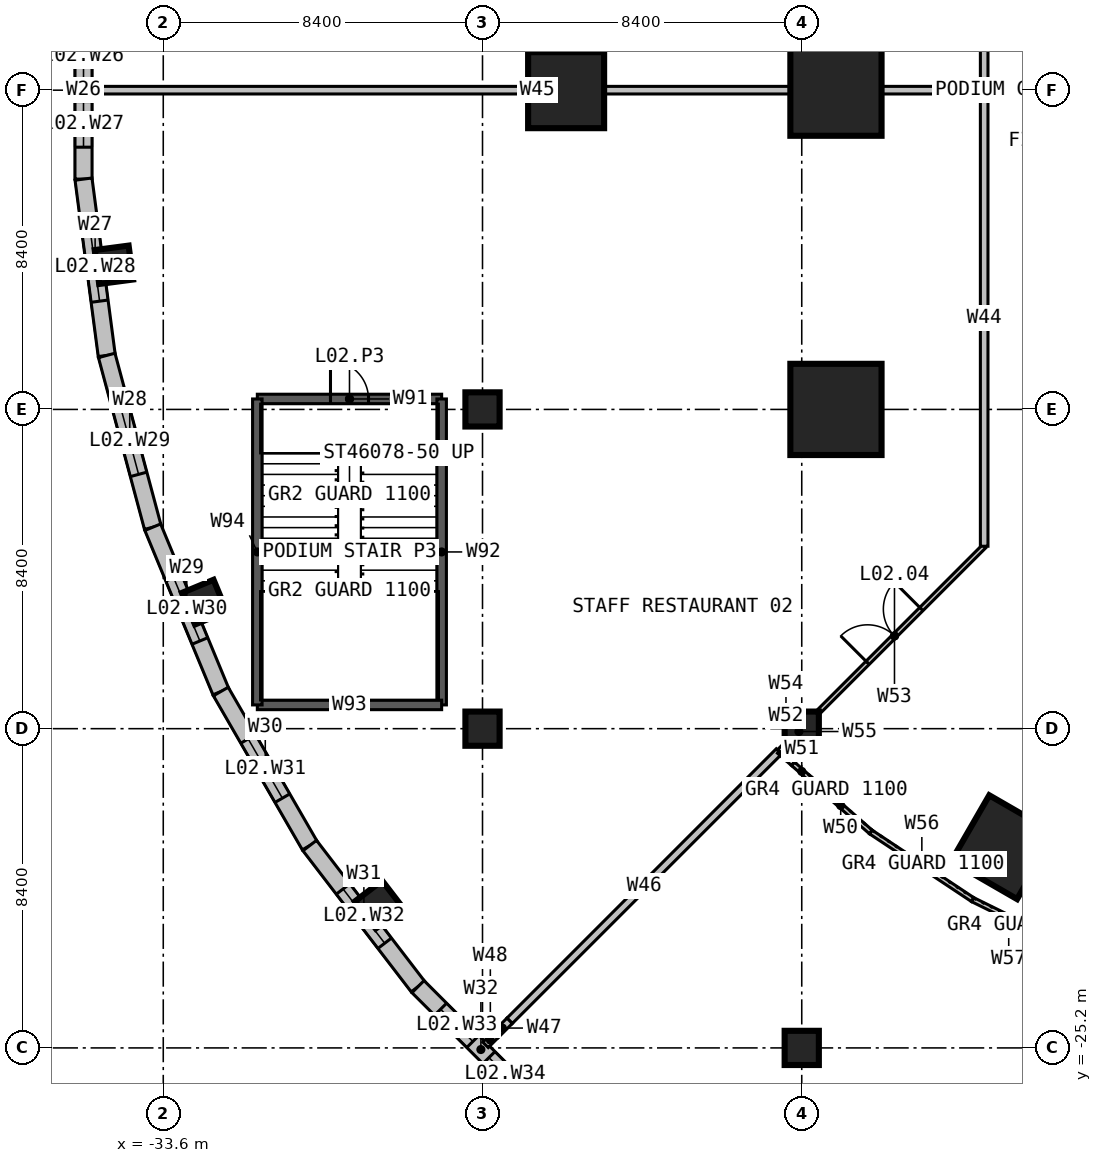
"""IFC4 building model, lengths in metres.
Left out: names, types, materials, properties, quantities, classifications, styles, units other than length and angle.
Written with IfcOpenShell. Run it as: python <this file> out.ifc"""

import sys

from ifc_helpers import new_model, si_unit, direction, frame, frame_2d, origin, origin_2d, place, context, subcontext, project, spatial, rectangle, hollow_rectangle, extrude, element, fill, save


model = new_model("IFC4")
c1 = context("Model", 3, precision=1e-05, world=origin(), true_north=direction((0.0, 1.0)))
c2 = subcontext(c1, "Body", "Model", "MODEL_VIEW")
j1 = project(units=[si_unit("LENGTHUNIT", "METRE"), si_unit("PLANEANGLEUNIT", "RADIAN")], contexts=[c1])
p1 = place(None, origin())
s1 = spatial("IfcSite", under=j1, at=p1, CompositionType="ELEMENT")
p2 = place(p1, origin())
s2 = spatial("IfcBuilding", under=s1, at=p2, CompositionType="ELEMENT")
p3 = place(p2, frame((0.0, 0.0, 11.0)))
s3 = spatial("IfcBuildingStorey", under=s2, at=p3, CompositionType="ELEMENT", Elevation=11.0)
for number, where, z_axis, x_axis in (
    (1, (-25.2, -16.8, 0.0), (0.0, 0.0, 1.0), (1.0, 0.0, 0.0)),
    (2, (-25.2, -8.4, 0.0), (0.0, 0.0, 1.0), (1.0, 0.0, 0.0)),
    (3, (-16.8, -25.2, 0.0), (0.0, 0.0, 1.0), (1.0, 0.0, 0.0)),
    (4, (-16.8, -16.8, 0.0), (0.0, 0.0, 1.0), (1.0, 0.0, 0.0)),
):
    element("IfcColumn", number, at=place(p3, frame(where, z_axis=z_axis, x_axis=x_axis)), inside=s3, PredefinedType="COLUMN", context=c2, shape_type="SweptSolid", body=[
        extrude(rectangle(XDim=0.9, YDim=0.9, at=origin_2d()), origin(), (0.0, 0.0, 1.0), 5.0),
    ])
for number, where, z_axis, x_axis in (
    (5, (-15.9, -8.4, 0.0), (0.0, 0.0, 1.0), (1.0, 0.0, 0.0)),
    (6, (-15.9, 0.0, 0.0), (0.0, 0.0, 1.0), (1.0, 0.0, 0.0)),
):
    element("IfcColumn", number, at=place(p3, frame(where, z_axis=z_axis, x_axis=x_axis)), inside=s3, PredefinedType="COLUMN", context=c2, shape_type="SweptSolid", body=[
        extrude(rectangle(XDim=2.4, YDim=2.4, at=origin_2d()), origin(), (0.0, 0.0, 1.0), 5.0),
    ])
for number, where, z_axis, x_axis in (
    (7, (-34.899, -4.594, 0.0), (0.0, 0.0, 1.0), (-0.991, -0.131, 0.0)),
    (8, (-32.521, -13.47, 0.0), (0.0, 0.0, 1.0), (-0.924, -0.383, 0.0)),
    (9, (-27.926, -21.428, 0.0), (0.0, 0.0, 1.0), (-0.793, -0.609, 0.0)),
):
    element("IfcColumn", number, at=place(p3, frame(where, z_axis=z_axis, x_axis=x_axis)), inside=s3, PredefinedType="COLUMN", context=c2, shape_type="SweptSolid", body=[
        extrude(rectangle(XDim=0.9, YDim=0.9, at=origin_2d()), origin(), (0.0, 0.0, 1.0), 5.0),
    ])
for number, where, z_axis, x_axis in (
    (10, (-23.0, 0.0, 0.0), (0.0, 0.0, 1.0), (-1.0, 0.0, 0.0)),
    (11, (-11.5, -19.919, 0.0), (0.0, 0.0, 1.0), (-0.5, -0.866, 0.0)),
):
    element("IfcColumn", number, at=place(p3, frame(where, z_axis=z_axis, x_axis=x_axis)), inside=s3, PredefinedType="COLUMN", context=c2, shape_type="SweptSolid", body=[
        extrude(hollow_rectangle(XDim=2.0, YDim=2.0, WallThickness=0.24, at=origin_2d()), origin(), (0.0, 0.0, 1.0), 5.0),
    ])
p4 = place(p3, frame((-35.698, 2.34, 0.0), z_axis=(0.0, 0.0, 1.0), x_axis=(0.0, -1.0, 0.0)))
e12 = element("IfcWall", 12, at=p4, inside=s3, PredefinedType="SOLIDWALL", context=c2, shape_type="SweptSolid", body=[
    extrude(rectangle(XDim=4.68, YDim=0.45, at=frame_2d((2.34, 0.0))), origin(), (0.0, 0.0, 1.0), 4.7),
])
p5 = place(p4, frame((0.84, 0.0, 0.9)))
e13 = element("IfcOpeningElement", 13, at=p5, cuts=e12, PredefinedType="OPENING", context=c2, shape_type="SweptSolid", body=[
    extrude(rectangle(XDim=1.2, YDim=2.4, at=frame_2d((0.6, 1.2))), frame((0.0, 0.235, 0.0), z_axis=(0.0, -1.0, 0.0), x_axis=(1.0, 0.0, 0.0)), (0.0, 0.0, 1.0), 0.47),
])
p6 = place(p4, frame((2.64, 0.0, 0.9)))
e14 = element("IfcOpeningElement", 14, at=p6, cuts=e12, PredefinedType="OPENING", context=c2, shape_type="SweptSolid", body=[
    extrude(rectangle(XDim=1.2, YDim=2.4, at=frame_2d((0.6, 1.2))), frame((0.0, 0.235, 0.0), z_axis=(0.0, -1.0, 0.0), x_axis=(1.0, 0.0, 0.0)), (0.0, 0.0, 1.0), 0.47),
])
p7 = place(p3, frame((-35.698, -2.34, 0.0), z_axis=(0.0, 0.0, 1.0), x_axis=(0.130536838198, -0.991443459746, 0.0)))
e15 = element("IfcWall", 15, at=p7, inside=s3, PredefinedType="SOLIDWALL", context=c2, shape_type="SweptSolid", body=[
    extrude(rectangle(XDim=4.679, YDim=0.45, at=frame_2d((2.34, 0.0))), origin(), (0.0, 0.0, 1.0), 4.7),
])
p8 = place(p7, frame((1.44, 0.0, 0.9)))
e16 = element("IfcOpeningElement", 16, at=p8, cuts=e15, PredefinedType="OPENING", context=c2, shape_type="SweptSolid", body=[
    extrude(rectangle(XDim=1.8, YDim=2.4, at=frame_2d((0.9, 1.2))), frame((0.0, 0.235, 0.0), z_axis=(0.0, -1.0, 0.0), x_axis=(1.0, 0.0, 0.0)), (0.0, 0.0, 1.0), 0.47),
])
p9 = place(p3, frame((-35.088, -6.979, 0.0), z_axis=(0.0, 0.0, 1.0), x_axis=(0.258815185258, -0.965926860523, 0.0)))
e17 = element("IfcWall", 17, at=p9, inside=s3, PredefinedType="SOLIDWALL", context=c2, shape_type="SweptSolid", body=[
    extrude(rectangle(XDim=4.68, YDim=0.45, at=frame_2d((2.34, 0.0))), origin(), (0.0, 0.0, 1.0), 4.7),
])
p10 = place(p9, frame((1.44, 0.0, 0.9)))
e18 = element("IfcOpeningElement", 18, at=p10, cuts=e17, PredefinedType="OPENING", context=c2, shape_type="SweptSolid", body=[
    extrude(rectangle(XDim=1.8, YDim=2.4, at=frame_2d((0.9, 1.2))), frame((0.0, 0.235, 0.0), z_axis=(0.0, -1.0, 0.0), x_axis=(1.0, 0.0, 0.0)), (0.0, 0.0, 1.0), 0.47),
])
p11 = place(p3, frame((-33.876, -11.5, 0.0), z_axis=(0.0, 0.0, 1.0), x_axis=(0.382669718086, -0.923885213032, 0.0)))
e19 = element("IfcWall", 19, at=p11, inside=s3, PredefinedType="SOLIDWALL", context=c2, shape_type="SweptSolid", body=[
    extrude(rectangle(XDim=4.68, YDim=0.45, at=frame_2d((2.34, 0.0))), origin(), (0.0, 0.0, 1.0), 4.7),
])
p12 = place(p11, frame((1.44, 0.0, 0.9)))
e20 = element("IfcOpeningElement", 20, at=p12, cuts=e19, PredefinedType="OPENING", context=c2, shape_type="SweptSolid", body=[
    extrude(rectangle(XDim=1.8, YDim=2.4, at=frame_2d((0.9, 1.2))), frame((0.0, 0.235, 0.0), z_axis=(0.0, -1.0, 0.0), x_axis=(1.0, 0.0, 0.0)), (0.0, 0.0, 1.0), 0.47),
])
p13 = place(p3, frame((-32.086, -15.823, 0.0), z_axis=(0.0, 0.0, 1.0), x_axis=(0.500022025083, -0.866012687223, 0.0)))
e21 = element("IfcWall", 21, at=p13, inside=s3, PredefinedType="SOLIDWALL", context=c2, shape_type="SweptSolid", body=[
    extrude(rectangle(XDim=4.679, YDim=0.45, at=frame_2d((2.34, 0.0))), origin(), (0.0, 0.0, 1.0), 4.7),
])
p14 = place(p13, frame((1.44, 0.0, 0.9)))
e22 = element("IfcOpeningElement", 22, at=p14, cuts=e21, PredefinedType="OPENING", context=c2, shape_type="SweptSolid", body=[
    extrude(rectangle(XDim=1.8, YDim=2.4, at=frame_2d((0.9, 1.2))), frame((0.0, 0.235, 0.0), z_axis=(0.0, -1.0, 0.0), x_axis=(1.0, 0.0, 0.0)), (0.0, 0.0, 1.0), 0.47),
])
p15 = place(p3, frame((-29.746, -19.875, 0.0), z_axis=(0.0, 0.0, 1.0), x_axis=(0.608769916927, -0.79334682721, 0.0)))
e23 = element("IfcWall", 23, at=p15, inside=s3, PredefinedType="SOLIDWALL", context=c2, shape_type="SweptSolid", body=[
    extrude(rectangle(XDim=4.68, YDim=0.45, at=frame_2d((2.34, 0.0))), origin(), (0.0, 0.0, 1.0), 4.7),
])
p16 = place(p15, frame((1.44, 0.0, 0.9)))
e24 = element("IfcOpeningElement", 24, at=p16, cuts=e23, PredefinedType="OPENING", context=c2, shape_type="SweptSolid", body=[
    extrude(rectangle(XDim=1.8, YDim=2.4, at=frame_2d((0.9, 1.2))), frame((0.0, 0.235, 0.0), z_axis=(0.0, -1.0, 0.0), x_axis=(1.0, 0.0, 0.0)), (0.0, 0.0, 1.0), 0.47),
])
p17 = place(p3, frame((-26.897, -23.588, 0.0), z_axis=(0.0, 0.0, 1.0), x_axis=(0.707106781187, -0.707106781187, 0.0)))
e25 = element("IfcWall", 25, at=p17, inside=s3, PredefinedType="SOLIDWALL", context=c2, shape_type="SweptSolid", body=[
    extrude(rectangle(XDim=4.679, YDim=0.45, at=frame_2d((2.34, 0.0))), origin(), (0.0, 0.0, 1.0), 4.7),
])
p18 = place(p17, frame((0.84, 0.0, 0.9)))
e26 = element("IfcOpeningElement", 26, at=p18, cuts=e25, PredefinedType="OPENING", context=c2, shape_type="SweptSolid", body=[
    extrude(rectangle(XDim=1.2, YDim=2.4, at=frame_2d((0.6, 1.2))), frame((0.0, 0.235, 0.0), z_axis=(0.0, -1.0, 0.0), x_axis=(1.0, 0.0, 0.0)), (0.0, 0.0, 1.0), 0.47),
])
p19 = place(p17, frame((2.64, 0.0, 0.9)))
e27 = element("IfcOpeningElement", 27, at=p19, cuts=e25, PredefinedType="OPENING", context=c2, shape_type="SweptSolid", body=[
    extrude(rectangle(XDim=1.2, YDim=2.4, at=frame_2d((0.6, 1.2))), frame((0.0, 0.235, 0.0), z_axis=(0.0, -1.0, 0.0), x_axis=(1.0, 0.0, 0.0)), (0.0, 0.0, 1.0), 0.47),
])
p20 = place(p3, frame((-31.125, -8.125, 0.0), z_axis=(0.0, 0.0, 1.0), x_axis=(1.0, 0.0, 0.0)))
e28 = element("IfcWall", 28, at=p20, inside=s3, PredefinedType="SOLIDWALL", context=c2, shape_type="SweptSolid", body=[
    extrude(rectangle(XDim=4.85, YDim=0.25, at=frame_2d((2.425, 0.0))), origin(), (0.0, 0.0, 1.0), 5.0),
])
p21 = place(p20, frame((1.925, 0.0, 0.0)))
e29 = element("IfcOpeningElement", 29, at=p21, cuts=e28, PredefinedType="OPENING", context=c2, shape_type="SweptSolid", body=[
    extrude(rectangle(XDim=1.0, YDim=2.2, at=frame_2d((0.5, 1.1))), frame((0.0, 0.135, 0.0), z_axis=(0.0, -1.0, 0.0), x_axis=(1.0, 0.0, 0.0)), (0.0, 0.0, 1.0), 0.27),
])
p22 = place(p3, frame((-26.275, -8.125, 0.0), z_axis=(0.0, 0.0, 1.0), x_axis=(0.0, -1.0, 0.0)))
e30 = element("IfcWall", 30, at=p22, inside=s3, PredefinedType="SOLIDWALL", context=c2, shape_type="SweptSolid", body=[
    extrude(rectangle(XDim=8.05, YDim=0.25, at=frame_2d((4.025, 0.0))), origin(), (0.0, 0.0, 1.0), 5.0),
])
p23 = place(p3, frame((-26.275, -16.175, 0.0), z_axis=(0.0, 0.0, 1.0), x_axis=(-1.0, 0.0, 0.0)))
e31 = element("IfcWall", 31, at=p23, inside=s3, PredefinedType="SOLIDWALL", context=c2, shape_type="SweptSolid", body=[
    extrude(rectangle(XDim=4.85, YDim=0.25, at=frame_2d((2.425, 0.0))), origin(), (0.0, 0.0, 1.0), 5.0),
])
p24 = place(p3, frame((-31.125, -16.175, 0.0), z_axis=(0.0, 0.0, 1.0), x_axis=(0.0, 1.0, 0.0)))
e32 = element("IfcWall", 32, at=p24, inside=s3, PredefinedType="SOLIDWALL", context=c2, shape_type="SweptSolid", body=[
    extrude(rectangle(XDim=8.05, YDim=0.25, at=frame_2d((4.025, 0.0))), origin(), (0.0, 0.0, 1.0), 5.0),
])
p25 = place(p3, frame((-35.52, 0.0, 0.0), z_axis=(0.0, 0.0, 1.0), x_axis=(1.0, 0.0, 0.0)))
e33 = element("IfcWall", 33, at=p25, inside=s3, PredefinedType="PARTITIONING", context=c2, shape_type="SweptSolid", body=[
    extrude(rectangle(XDim=23.52, YDim=0.2, at=frame_2d((11.76, 0.0))), origin(), (0.0, 0.0, 1.0), 4.7),
])
p26 = place(p3, frame((-24.486, -24.486, 0.0), z_axis=(0.0, 0.0, 1.0), x_axis=(0.707106781187, 0.707106781187, 0.0)))
e34 = element("IfcWall", 34, at=p26, inside=s3, PredefinedType="PARTITIONING", context=c2, shape_type="SweptSolid", body=[
    extrude(rectangle(XDim=10.022, YDim=0.2, at=frame_2d((5.011, 0.0))), origin(), (0.0, 0.0, 1.0), 4.7),
])
p27 = place(p3, frame((-24.868, -24.868, 0.0), z_axis=(0.0, 0.0, 1.0), x_axis=(0.707106781187, 0.707106781187, 0.0)))
e35 = element("IfcWall", 35, at=p27, inside=s3, PredefinedType="PARTITIONING", context=c2, shape_type="SweptSolid", body=[
    extrude(rectangle(XDim=0.54, YDim=0.2, at=frame_2d((0.27, 0.0))), origin(), (0.0, 0.0, 1.0), 4.3),
])
p28 = place(p3, frame((-25.12, -25.12, 0.0), z_axis=(0.0, 0.0, 1.0), x_axis=(0.707106781187, 0.707106781187, 0.0)))
e36 = element("IfcWall", 36, at=p28, inside=s3, PredefinedType="PARTITIONING", context=c2, shape_type="SweptSolid", body=[
    extrude(rectangle(XDim=0.356, YDim=0.2, at=frame_2d((0.178, 0.0))), origin(), (0.0, 0.0, 1.0), 4.7),
])
p29 = place(p3, frame((-16.57, -18.127, 0.0), z_axis=(0.0, 0.0, 1.0), x_axis=(0.752226011438, -0.658905173538, 0.0)))
e37 = element("IfcWall", 37, at=p29, inside=s3, PredefinedType="PARTITIONING", context=c2, shape_type="SweptSolid", body=[
    extrude(rectangle(XDim=2.114, YDim=0.12, at=frame_2d((1.057, 0.0))), origin(), (0.0, 0.0, 1.0), 4.7),
])
p30 = place(p3, frame((-17.03, -17.724, 0.0), z_axis=(0.0, 0.0, 1.0), x_axis=(0.752081905539, -0.65906965289, 0.0)))
e38 = element("IfcWall", 38, at=p30, inside=s3, PredefinedType="PARTITIONING", context=c2, shape_type="SweptSolid", body=[
    extrude(rectangle(XDim=0.612, YDim=0.12, at=frame_2d((0.306, 0.0))), origin(), (0.0, 0.0, 1.0), 4.3),
])
p31 = place(p3, frame((-17.4, -17.4, 0.0), z_axis=(0.0, 0.0, 1.0), x_axis=(0.751992181934, -0.659172024824, 0.0)))
e39 = element("IfcWall", 39, at=p31, inside=s3, PredefinedType="PARTITIONING", context=c2, shape_type="SweptSolid", body=[
    extrude(rectangle(XDim=0.492, YDim=0.12, at=frame_2d((0.246, 0.0))), origin(), (0.0, 0.0, 1.0), 4.7),
])
p32 = place(p3, frame((-16.72, -16.72, 0.0), z_axis=(0.0, 0.0, 1.0), x_axis=(0.707106781187, 0.707106781187, 0.0)))
e40 = element("IfcWall", 40, at=p32, inside=s3, PredefinedType="PARTITIONING", context=c2, shape_type="SweptSolid", body=[
    extrude(rectangle(XDim=6.675, YDim=0.12, at=frame_2d((3.337, 0.0))), origin(), (0.0, 0.0, 1.0), 4.7),
])
p33 = place(p32, frame((2.338, 0.0, 0.0)))
e41 = element("IfcOpeningElement", 41, at=p33, cuts=e40, PredefinedType="OPENING", context=c2, shape_type="SweptSolid", body=[
    extrude(rectangle(XDim=2.0, YDim=2.4, at=frame_2d((1.0, 1.2))), frame((0.0, 0.07, 0.0), z_axis=(0.0, -1.0, 0.0), x_axis=(1.0, 0.0, 0.0)), (0.0, 0.0, 1.0), 0.14),
])
p34 = place(p3, frame((-17.4, -17.4, 0.0), z_axis=(0.0, 0.0, 1.0), x_axis=(0.707106781187, 0.707106781187, 0.0)))
e42 = element("IfcWall", 42, at=p34, inside=s3, PredefinedType="PARTITIONING", context=c2, shape_type="SweptSolid", body=[
    extrude(rectangle(XDim=0.523, YDim=0.12, at=frame_2d((0.262, 0.0))), origin(), (0.0, 0.0, 1.0), 4.7),
])
p35 = place(p3, frame((-17.03, -17.03, 0.0), z_axis=(0.0, 0.0, 1.0), x_axis=(0.707106781187, 0.707106781187, 0.0)))
e43 = element("IfcWall", 43, at=p35, inside=s3, PredefinedType="PARTITIONING", context=c2, shape_type="SweptSolid", body=[
    extrude(rectangle(XDim=0.438, YDim=0.12, at=frame_2d((0.219, 0.0))), origin(), (0.0, 0.0, 1.0), 4.3),
])
p36 = place(p3, frame((-14.98, -19.52, 0.0), z_axis=(0.0, 0.0, 1.0), x_axis=(0.832994734858, -0.553280915719, 0.0)))
e44 = element("IfcWall", 44, at=p36, inside=s3, PredefinedType="PARTITIONING", context=c2, shape_type="SweptSolid", body=[
    extrude(rectangle(XDim=3.217, YDim=0.12, at=frame_2d((1.609, 0.0))), origin(), (0.0, 0.0, 1.0), 4.7),
])
p37 = place(p3, frame((-12.3, -21.3, 0.0), z_axis=(0.0, 0.0, 1.0), x_axis=(0.896913641042, -0.442205744551, 0.0)))
e45 = element("IfcWall", 45, at=p37, inside=s3, PredefinedType="PARTITIONING", context=c2, shape_type="SweptSolid", body=[
    extrude(rectangle(XDim=2.109, YDim=0.12, at=frame_2d((1.055, 0.0))), origin(), (0.0, 0.0, 1.0), 4.7),
])
p38 = place(p3, frame((-12.0, 12.0, 0.0), z_axis=(0.0, 0.0, 1.0), x_axis=(0.0, -1.0, 0.0)))
e46 = element("IfcWall", 46, at=p38, inside=s3, PredefinedType="PARTITIONING", context=c2, shape_type="SweptSolid", body=[
    extrude(rectangle(XDim=12.0, YDim=0.2, at=frame_2d((6.0, 0.0))), origin(), (0.0, 0.0, 1.0), 4.7),
])
p39 = place(p38, frame((5.0, 0.0, 0.0)))
e47 = element("IfcOpeningElement", 47, at=p39, cuts=e46, PredefinedType="OPENING", context=c2, shape_type="SweptSolid", body=[
    extrude(rectangle(XDim=2.0, YDim=2.4, at=frame_2d((1.0, 1.2))), frame((0.0, 0.11, 0.0), z_axis=(0.0, -1.0, 0.0), x_axis=(1.0, 0.0, 0.0)), (0.0, 0.0, 1.0), 0.22),
])
p40 = place(p3, frame((-12.0, 0.0, 0.0), z_axis=(0.0, 0.0, 1.0), x_axis=(0.0, -1.0, 0.0)))
e48 = element("IfcWall", 48, at=p40, inside=s3, PredefinedType="PARTITIONING", context=c2, shape_type="SweptSolid", body=[
    extrude(rectangle(XDim=12.0, YDim=0.2, at=frame_2d((6.0, 0.0))), origin(), (0.0, 0.0, 1.0), 4.7),
])
p41 = place(p5, origin())
e49 = element("IfcWindow", 49, at=p41, inside=s3, PartitioningType="SINGLE_PANEL", PredefinedType="WINDOW", context=c2, shape_type="SweptSolid", body=[
    extrude(rectangle(XDim=1.2, YDim=2.4, at=frame_2d((0.6, 1.2))), frame((0.0, 0.03, 0.0), z_axis=(0.0, -1.0, 0.0), x_axis=(1.0, 0.0, 0.0)), (0.0, 0.0, 1.0), 0.06),
])
fill(e13, e49)
p42 = place(p6, origin())
e50 = element("IfcWindow", 50, at=p42, inside=s3, PartitioningType="SINGLE_PANEL", PredefinedType="WINDOW", context=c2, shape_type="SweptSolid", body=[
    extrude(rectangle(XDim=1.2, YDim=2.4, at=frame_2d((0.6, 1.2))), frame((0.0, 0.03, 0.0), z_axis=(0.0, -1.0, 0.0), x_axis=(1.0, 0.0, 0.0)), (0.0, 0.0, 1.0), 0.06),
])
fill(e14, e50)
p43 = place(p8, origin())
e51 = element("IfcWindow", 51, at=p43, inside=s3, PartitioningType="SINGLE_PANEL", PredefinedType="WINDOW", context=c2, shape_type="SweptSolid", body=[
    extrude(rectangle(XDim=1.8, YDim=2.4, at=frame_2d((0.9, 1.2))), frame((0.0, 0.03, 0.0), z_axis=(0.0, -1.0, 0.0), x_axis=(1.0, 0.0, 0.0)), (0.0, 0.0, 1.0), 0.06),
])
fill(e16, e51)
p44 = place(p10, origin())
e52 = element("IfcWindow", 52, at=p44, inside=s3, PartitioningType="SINGLE_PANEL", PredefinedType="WINDOW", context=c2, shape_type="SweptSolid", body=[
    extrude(rectangle(XDim=1.8, YDim=2.4, at=frame_2d((0.9, 1.2))), frame((0.0, 0.03, 0.0), z_axis=(0.0, -1.0, 0.0), x_axis=(1.0, 0.0, 0.0)), (0.0, 0.0, 1.0), 0.06),
])
fill(e18, e52)
p45 = place(p12, origin())
e53 = element("IfcWindow", 53, at=p45, inside=s3, PartitioningType="SINGLE_PANEL", PredefinedType="WINDOW", context=c2, shape_type="SweptSolid", body=[
    extrude(rectangle(XDim=1.8, YDim=2.4, at=frame_2d((0.9, 1.2))), frame((0.0, 0.03, 0.0), z_axis=(0.0, -1.0, 0.0), x_axis=(1.0, 0.0, 0.0)), (0.0, 0.0, 1.0), 0.06),
])
fill(e20, e53)
p46 = place(p14, origin())
e54 = element("IfcWindow", 54, at=p46, inside=s3, PartitioningType="SINGLE_PANEL", PredefinedType="WINDOW", context=c2, shape_type="SweptSolid", body=[
    extrude(rectangle(XDim=1.8, YDim=2.4, at=frame_2d((0.9, 1.2))), frame((0.0, 0.03, 0.0), z_axis=(0.0, -1.0, 0.0), x_axis=(1.0, 0.0, 0.0)), (0.0, 0.0, 1.0), 0.06),
])
fill(e22, e54)
p47 = place(p16, origin())
e55 = element("IfcWindow", 55, at=p47, inside=s3, PartitioningType="SINGLE_PANEL", PredefinedType="WINDOW", context=c2, shape_type="SweptSolid", body=[
    extrude(rectangle(XDim=1.8, YDim=2.4, at=frame_2d((0.9, 1.2))), frame((0.0, 0.03, 0.0), z_axis=(0.0, -1.0, 0.0), x_axis=(1.0, 0.0, 0.0)), (0.0, 0.0, 1.0), 0.06),
])
fill(e24, e55)
p48 = place(p18, origin())
e56 = element("IfcWindow", 56, at=p48, inside=s3, PartitioningType="SINGLE_PANEL", PredefinedType="WINDOW", context=c2, shape_type="SweptSolid", body=[
    extrude(rectangle(XDim=1.2, YDim=2.4, at=frame_2d((0.6, 1.2))), frame((0.0, 0.03, 0.0), z_axis=(0.0, -1.0, 0.0), x_axis=(1.0, 0.0, 0.0)), (0.0, 0.0, 1.0), 0.06),
])
fill(e26, e56)
p49 = place(p19, origin())
e57 = element("IfcWindow", 57, at=p49, inside=s3, PartitioningType="SINGLE_PANEL", PredefinedType="WINDOW", context=c2, shape_type="SweptSolid", body=[
    extrude(rectangle(XDim=1.2, YDim=2.4, at=frame_2d((0.6, 1.2))), frame((0.0, 0.03, 0.0), z_axis=(0.0, -1.0, 0.0), x_axis=(1.0, 0.0, 0.0)), (0.0, 0.0, 1.0), 0.06),
])
fill(e27, e57)
p50 = place(p21, origin())
e58 = element("IfcDoor", 58, at=p50, inside=s3, OperationType="SINGLE_SWING_LEFT", PredefinedType="DOOR", context=c2, shape_type="SweptSolid", body=[
    extrude(rectangle(XDim=1.0, YDim=2.2, at=frame_2d((0.5, 1.1))), frame((0.0, 0.025, 0.0), z_axis=(0.0, -1.0, 0.0), x_axis=(1.0, 0.0, 0.0)), (0.0, 0.0, 1.0), 0.05),
])
fill(e29, e58)
p51 = place(p33, origin())
e59 = element("IfcDoor", 59, at=p51, inside=s3, OperationType="DOUBLE_DOOR_SINGLE_SWING", PredefinedType="DOOR", context=c2, shape_type="SweptSolid", body=[
    extrude(rectangle(XDim=2.0, YDim=2.4, at=frame_2d((1.0, 1.2))), frame((0.0, 0.025, 0.0), z_axis=(0.0, -1.0, 0.0), x_axis=(1.0, 0.0, 0.0)), (0.0, 0.0, 1.0), 0.05),
])
fill(e41, e59)
save(model, sys.argv[1])
